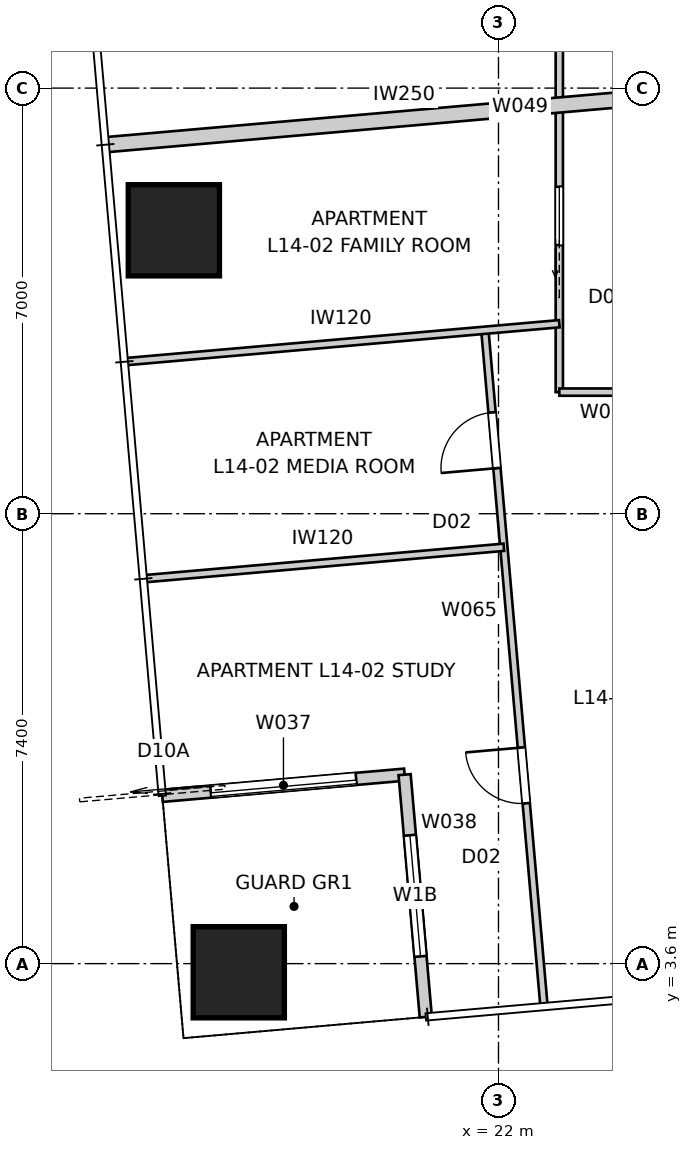
"""IFC4 building model, lengths in metres.
Left out: names, types, materials, properties, quantities, classifications, styles, units other than length and angle.
Written with IfcOpenShell. Run it as: python <this file> out.ifc"""

import sys

from ifc_helpers import new_model, si_unit, direction, frame, frame_2d, origin, origin_2d, place, context, subcontext, project, spatial, rectangle, extrude, element, fill, save


model = new_model("IFC4")
c1 = context("Model", 3, precision=1e-05, world=origin(), true_north=direction((0.0, 1.0)))
c2 = subcontext(c1, "Body", "Model", "MODEL_VIEW")
j1 = project(units=[si_unit("LENGTHUNIT", "METRE"), si_unit("PLANEANGLEUNIT", "RADIAN")], contexts=[c1])
p1 = place(None, origin())
s1 = spatial("IfcSite", under=j1, at=p1, CompositionType="ELEMENT")
p2 = place(p1, origin())
s2 = spatial("IfcBuilding", under=s1, at=p2, CompositionType="ELEMENT")
p3 = place(p2, frame((0.0, 0.0, 54.0)))
s3 = spatial("IfcBuildingStorey", under=s2, at=p3, CompositionType="ELEMENT", Elevation=54.0)
for number, where, z_axis, x_axis in (
    (1, (17.729, 3.458, 0.0), (0.0, 0.0, 1.0), (1.0, 0.0, 0.0)),
    (2, (16.661, 15.661, 0.0), (0.0, 0.0, 1.0), (1.0, 0.0, 0.0)),
):
    element("IfcColumn", number, at=place(p3, frame(where, z_axis=z_axis, x_axis=x_axis)), inside=s3, PredefinedType="COLUMN", context=c2, shape_type="SweptSolid", body=[
        extrude(rectangle(XDim=1.5, YDim=1.5, at=origin_2d()), origin(), (0.0, 0.0, 1.0), 3.4),
    ])
p4 = place(p3, frame((16.471, 6.359, 0.0), z_axis=(0.0, 0.0, 1.0), x_axis=(0.99619418125, 0.087161650072, 0.0)))
e3 = element("IfcWall", 3, at=p4, inside=s3, PredefinedType="SOLIDWALL", context=c2, shape_type="SweptSolid", body=[
    extrude(rectangle(XDim=4.0, YDim=0.2, at=frame_2d((2.0, 0.0))), origin(), (0.0, 0.0, 1.0), 3.25),
])
p5 = place(p4, frame((0.8, 0.0, 0.0)))
e4 = element("IfcOpeningElement", 4, at=p5, cuts=e3, PredefinedType="OPENING", context=c2, shape_type="SweptSolid", body=[
    extrude(rectangle(XDim=2.4, YDim=2.1, at=frame_2d((1.2, 1.05))), frame((0.0, 0.11, 0.0), z_axis=(0.0, -1.0, 0.0), x_axis=(1.0, 0.0, 0.0)), (0.0, 0.0, 1.0), 0.22),
])
p6 = place(p3, frame((20.456, 6.708, 0.0), z_axis=(0.0, 0.0, 1.0), x_axis=(0.087156350505, -0.99619464492, 0.0)))
e5 = element("IfcWall", 5, at=p6, inside=s3, PredefinedType="SOLIDWALL", context=c2, shape_type="SweptSolid", body=[
    extrude(rectangle(XDim=4.0, YDim=0.2, at=frame_2d((2.0, 0.0))), origin(), (0.0, 0.0, 1.0), 3.25),
])
p7 = place(p6, frame((1.0, 0.0, 0.45)))
e6 = element("IfcOpeningElement", 6, at=p7, cuts=e5, PredefinedType="OPENING", context=c2, shape_type="SweptSolid", body=[
    extrude(rectangle(XDim=2.0, YDim=1.8, at=frame_2d((1.0, 0.9))), frame((0.0, 0.11, 0.0), z_axis=(0.0, -1.0, 0.0), x_axis=(1.0, 0.0, 0.0)), (0.0, 0.0, 1.0), 0.22),
])
p8 = place(p3, frame((15.534, 17.068, 0.0), z_axis=(0.0, 0.0, 1.0), x_axis=(0.996194517831, 0.087157803114, 0.0)))
e7 = element("IfcWall", 7, at=p8, inside=s3, PredefinedType="PARTITIONING", context=c2, shape_type="SweptSolid", body=[
    extrude(rectangle(XDim=9.933, YDim=0.25, at=frame_2d((4.966, 0.0))), origin(), (0.0, 0.0, 1.0), 3.25),
])
p9 = place(p3, frame((23.0, 13.0, 0.0), z_axis=(0.0, 0.0, 1.0), x_axis=(0.0, 1.0, 0.0)))
e8 = element("IfcWall", 8, at=p9, inside=s3, PredefinedType="PARTITIONING", context=c2, shape_type="SweptSolid", body=[
    extrude(rectangle(XDim=6.0, YDim=0.12, at=frame_2d((3.0, 0.0))), origin(), (0.0, 0.0, 1.0), 3.25),
])
p10 = place(p9, frame((2.418, 0.0, 0.0)))
e9 = element("IfcOpeningElement", 9, at=p10, cuts=e8, PredefinedType="OPENING", context=c2, shape_type="SweptSolid", body=[
    extrude(rectangle(XDim=0.96, YDim=2.1, at=frame_2d((0.48, 1.05))), frame((0.0, 0.07, 0.0), z_axis=(0.0, -1.0, 0.0), x_axis=(1.0, 0.0, 0.0)), (0.0, 0.0, 1.0), 0.14),
])
p11 = place(p3, frame((29.0, 13.0, 0.0), z_axis=(0.0, 0.0, 1.0), x_axis=(-1.0, 0.0, 0.0)))
e10 = element("IfcWall", 10, at=p11, inside=s3, PredefinedType="PARTITIONING", context=c2, shape_type="SweptSolid", body=[
    extrude(rectangle(XDim=6.0, YDim=0.12, at=frame_2d((3.0, 0.0))), origin(), (0.0, 0.0, 1.0), 3.25),
])
p12 = place(p11, frame((3.445, 0.0, 0.0)))
e11 = element("IfcOpeningElement", 11, at=p12, cuts=e10, PredefinedType="OPENING", context=c2, shape_type="SweptSolid", body=[
    extrude(rectangle(XDim=0.96, YDim=2.1, at=frame_2d((0.48, 1.05))), frame((0.0, 0.07, 0.0), z_axis=(0.0, -1.0, 0.0), x_axis=(1.0, 0.0, 0.0)), (0.0, 0.0, 1.0), 0.14),
])
p13 = place(p11, frame((0.769, 0.0, 0.0)))
e12 = element("IfcOpeningElement", 12, at=p13, cuts=e10, PredefinedType="OPENING", context=c2, shape_type="SweptSolid", body=[
    extrude(rectangle(XDim=0.96, YDim=2.1, at=frame_2d((0.48, 1.05))), frame((0.0, 0.07, 0.0), z_axis=(0.0, -1.0, 0.0), x_axis=(1.0, 0.0, 0.0)), (0.0, 0.0, 1.0), 0.14),
])
p14 = place(p3, frame((22.745, 2.933, 0.0), z_axis=(0.0, 0.0, 1.0), x_axis=(-0.087152252187, 0.99619500347, 0.0)))
e13 = element("IfcWall", 13, at=p14, inside=s3, PredefinedType="PARTITIONING", context=c2, shape_type="SweptSolid", body=[
    extrude(rectangle(XDim=11.127, YDim=0.12, at=frame_2d((5.563, 0.0))), origin(), (0.0, 0.0, 1.0), 3.25),
])
p15 = place(p14, frame((3.317, 0.0, 0.0)))
e14 = element("IfcOpeningElement", 14, at=p15, cuts=e13, PredefinedType="OPENING", context=c2, shape_type="SweptSolid", body=[
    extrude(rectangle(XDim=0.92, YDim=2.34, at=frame_2d((0.46, 1.17))), frame((0.0, 0.07, 0.0), z_axis=(0.0, -1.0, 0.0), x_axis=(1.0, 0.0, 0.0)), (0.0, 0.0, 1.0), 0.14),
])
p16 = place(p14, frame((8.85, 0.0, 0.0)))
e15 = element("IfcOpeningElement", 15, at=p16, cuts=e13, PredefinedType="OPENING", context=c2, shape_type="SweptSolid", body=[
    extrude(rectangle(XDim=0.92, YDim=2.34, at=frame_2d((0.46, 1.17))), frame((0.0, 0.07, 0.0), z_axis=(0.0, -1.0, 0.0), x_axis=(1.0, 0.0, 0.0)), (0.0, 0.0, 1.0), 0.14),
])
p17 = place(p3, frame((15.886, 13.502, 0.0), z_axis=(0.0, 0.0, 1.0), x_axis=(0.996195424363, 0.087147441029, 0.0)))
e16 = element("IfcWall", 16, at=p17, inside=s3, PredefinedType="PARTITIONING", context=c2, shape_type="SweptSolid", body=[
    extrude(rectangle(XDim=7.141, YDim=0.12, at=frame_2d((3.57, 0.0))), origin(), (0.0, 0.0, 1.0), 2.638),
])
p18 = place(p3, frame((16.198, 9.933, 0.0), z_axis=(0.0, 0.0, 1.0), x_axis=(0.996196451325, 0.087135700879, 0.0)))
e17 = element("IfcWall", 17, at=p18, inside=s3, PredefinedType="PARTITIONING", context=c2, shape_type="SweptSolid", body=[
    extrude(rectangle(XDim=5.912, YDim=0.12, at=frame_2d((2.956, 0.0))), origin(), (0.0, 0.0, 1.0), 3.25),
])
p19 = place(p5, origin())
e18 = element("IfcDoor", 18, at=p19, inside=s3, OperationType="SLIDING_TO_LEFT", PredefinedType="DOOR", context=c2, shape_type="SweptSolid", body=[
    extrude(rectangle(XDim=2.4, YDim=2.1, at=frame_2d((1.2, 1.05))), frame((0.0, 0.025, 0.0), z_axis=(0.0, -1.0, 0.0), x_axis=(1.0, 0.0, 0.0)), (0.0, 0.0, 1.0), 0.05),
])
fill(e4, e18)
p20 = place(p7, origin())
e19 = element("IfcWindow", 19, at=p20, inside=s3, PartitioningType="SINGLE_PANEL", PredefinedType="WINDOW", context=c2, shape_type="SweptSolid", body=[
    extrude(rectangle(XDim=2.0, YDim=1.8, at=frame_2d((1.0, 0.9))), frame((0.0, 0.03, 0.0), z_axis=(0.0, -1.0, 0.0), x_axis=(1.0, 0.0, 0.0)), (0.0, 0.0, 1.0), 0.06),
])
fill(e6, e19)
p21 = place(p10, origin())
e20 = element("IfcDoor", 20, at=p21, inside=s3, OperationType="SLIDING_TO_LEFT", PredefinedType="DOOR", context=c2, shape_type="SweptSolid", body=[
    extrude(rectangle(XDim=0.96, YDim=2.1, at=frame_2d((0.48, 1.05))), frame((0.0, 0.025, 0.0), z_axis=(0.0, -1.0, 0.0), x_axis=(1.0, 0.0, 0.0)), (0.0, 0.0, 1.0), 0.05),
])
fill(e9, e20)
p22 = place(p15, origin())
e21 = element("IfcDoor", 21, at=p22, inside=s3, OperationType="SINGLE_SWING_RIGHT", PredefinedType="DOOR", context=c2, shape_type="SweptSolid", body=[
    extrude(rectangle(XDim=0.92, YDim=2.34, at=frame_2d((0.46, 1.17))), frame((0.0, 0.025, 0.0), z_axis=(0.0, -1.0, 0.0), x_axis=(1.0, 0.0, 0.0)), (0.0, 0.0, 1.0), 0.05),
])
fill(e14, e21)
p23 = place(p16, origin())
e22 = element("IfcDoor", 22, at=p23, inside=s3, OperationType="SINGLE_SWING_LEFT", PredefinedType="DOOR", context=c2, shape_type="SweptSolid", body=[
    extrude(rectangle(XDim=0.92, YDim=2.34, at=frame_2d((0.46, 1.17))), frame((0.0, 0.025, 0.0), z_axis=(0.0, -1.0, 0.0), x_axis=(1.0, 0.0, 0.0)), (0.0, 0.0, 1.0), 0.05),
])
fill(e15, e22)
save(model, sys.argv[1])
